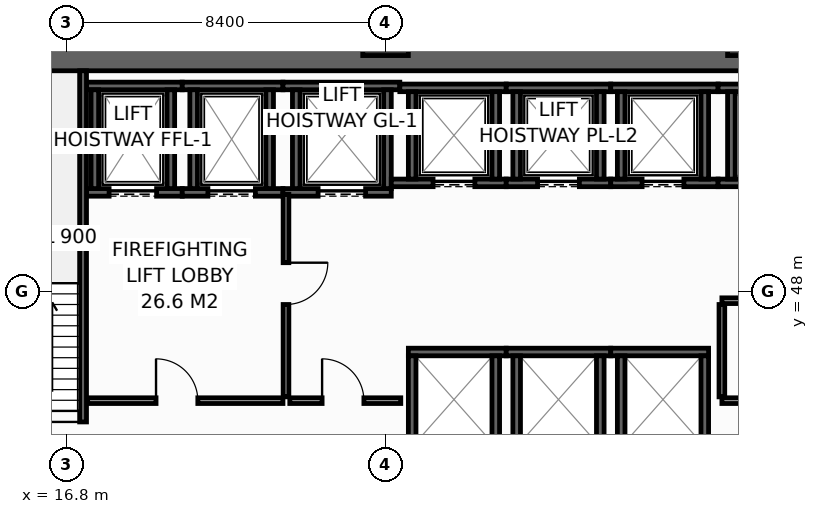
"""IFC4 building model, lengths in metres.
Left out: names, types, materials, properties, quantities, classifications, styles, units other than length and angle.
Written with IfcOpenShell. Run it as: python <this file> out.ifc"""

import sys

from ifc_helpers import new_model, si_unit, direction, frame, frame_2d, origin, origin_2d, place, context, subcontext, project, spatial, rectangle, hollow_rectangle, extrude, element, fill, save


model = new_model("IFC4")
c1 = context("Model", 3, precision=1e-05, world=origin(), true_north=direction((0.0, 1.0)))
c2 = subcontext(c1, "Body", "Model", "MODEL_VIEW")
j1 = project(units=[si_unit("LENGTHUNIT", "METRE"), si_unit("PLANEANGLEUNIT", "RADIAN")], contexts=[c1])
p1 = place(None, origin())
s1 = spatial("IfcSite", under=j1, at=p1, CompositionType="ELEMENT")
p2 = place(p1, origin())
s2 = spatial("IfcBuilding", under=s1, at=p2, CompositionType="ELEMENT")
p3 = place(p2, frame((0.0, 0.0, 78.0)))
s3 = spatial("IfcBuildingStorey", under=s2, at=p3, CompositionType="ELEMENT", Elevation=78.0)
p4 = place(p3, frame((13.5, 54.1, 0.0), z_axis=(0.0, 0.0, 1.0), x_axis=(1.0, 0.0, 0.0)))
e1 = element("IfcWall", 1, at=p4, inside=s3, PredefinedType="SHEAR", context=c2, shape_type="SweptSolid", body=[
    extrude(rectangle(XDim=32.9, YDim=0.6, at=frame_2d((16.45, 0.0))), origin(), (0.0, 0.0, 1.0), 4.15),
])
for number, where, z_axis, x_axis in (
    (2, (25.2, 54.8, 0.0), (0.0, 0.0, 1.0), (1.0, 0.0, 0.0)),
    (3, (34.8, 54.8, 0.0), (0.0, 0.0, 1.0), (1.0, 0.0, 0.0)),
):
    element("IfcColumn", number, at=place(p3, frame(where, z_axis=z_axis, x_axis=x_axis)), inside=s3, PredefinedType="COLUMN", context=c2, shape_type="SweptSolid", body=[
        extrude(hollow_rectangle(XDim=1.2, YDim=1.2, WallThickness=0.055, at=origin_2d()), origin(), (0.0, 0.0, 1.0), 4.4),
    ])
p5 = place(p3, frame((17.33, 50.6, 0.0), z_axis=(0.0, 0.0, 1.0), x_axis=(1.0, 0.0, 0.0)))
e4 = element("IfcWall", 4, at=p5, inside=s3, PredefinedType="SHEAR", context=c2, shape_type="SweptSolid", body=[
    extrude(rectangle(XDim=2.52, YDim=0.2, at=frame_2d((1.26, 0.0))), origin(), (0.0, 0.0, 1.0), 4.15),
])
p6 = place(p5, frame((0.595, 0.0, 0.0)))
e5 = element("IfcOpeningElement", 5, at=p6, cuts=e4, PredefinedType="OPENING", context=c2, shape_type="SweptSolid", body=[
    extrude(rectangle(XDim=1.25, YDim=2.3, at=frame_2d((0.625, 1.15))), frame((0.0, 0.11, 0.0), z_axis=(0.0, -1.0, 0.0), x_axis=(1.0, 0.0, 0.0)), (0.0, 0.0, 1.0), 0.22),
])
p7 = place(p3, frame((17.33, 53.4, 0.0), z_axis=(0.0, 0.0, 1.0), x_axis=(1.0, 0.0, 0.0)))
e6 = element("IfcWall", 6, at=p7, inside=s3, PredefinedType="SHEAR", context=c2, shape_type="SweptSolid", body=[
    extrude(rectangle(XDim=2.52, YDim=0.2, at=frame_2d((1.26, 0.0))), origin(), (0.0, 0.0, 1.0), 4.15),
])
for number, where, z_axis, x_axis in (
    (7, (17.55, 50.7, 0.0), (0.0, 0.0, 1.0), (0.0, 1.0, 0.0)),
    (8, (19.55, 50.7, 0.0), (0.0, 0.0, 1.0), (0.0, 1.0, 0.0)),
):
    element("IfcWall", number, at=place(p3, frame(where, z_axis=z_axis, x_axis=x_axis)), inside=s3, PredefinedType="SHEAR", context=c2, shape_type="SweptSolid", body=[
        extrude(rectangle(XDim=2.6, YDim=0.2, at=frame_2d((1.3, 0.0))), origin(), (0.0, 0.0, 1.0), 4.15),
    ])
p8 = place(p3, frame((19.85, 50.6, 0.0), z_axis=(0.0, 0.0, 1.0), x_axis=(1.0, 0.0, 0.0)))
e9 = element("IfcWall", 9, at=p8, inside=s3, PredefinedType="SHEAR", context=c2, shape_type="SweptSolid", body=[
    extrude(rectangle(XDim=2.65, YDim=0.2, at=frame_2d((1.325, 0.0))), origin(), (0.0, 0.0, 1.0), 4.15),
])
p9 = place(p8, frame((0.675, 0.0, 0.0)))
e10 = element("IfcOpeningElement", 10, at=p9, cuts=e9, PredefinedType="OPENING", context=c2, shape_type="SweptSolid", body=[
    extrude(rectangle(XDim=1.25, YDim=2.3, at=frame_2d((0.625, 1.15))), frame((0.0, 0.11, 0.0), z_axis=(0.0, -1.0, 0.0), x_axis=(1.0, 0.0, 0.0)), (0.0, 0.0, 1.0), 0.22),
])
p10 = place(p3, frame((19.85, 53.4, 0.0), z_axis=(0.0, 0.0, 1.0), x_axis=(1.0, 0.0, 0.0)))
e11 = element("IfcWall", 11, at=p10, inside=s3, PredefinedType="SHEAR", context=c2, shape_type="SweptSolid", body=[
    extrude(rectangle(XDim=2.65, YDim=0.2, at=frame_2d((1.325, 0.0))), origin(), (0.0, 0.0, 1.0), 4.15),
])
for number, where, z_axis, x_axis in (
    (12, (20.15, 50.7, 0.0), (0.0, 0.0, 1.0), (0.0, 1.0, 0.0)),
    (13, (22.15, 50.7, 0.0), (0.0, 0.0, 1.0), (0.0, 1.0, 0.0)),
):
    element("IfcWall", number, at=place(p3, frame(where, z_axis=z_axis, x_axis=x_axis)), inside=s3, PredefinedType="SHEAR", context=c2, shape_type="SweptSolid", body=[
        extrude(rectangle(XDim=2.6, YDim=0.2, at=frame_2d((1.3, 0.0))), origin(), (0.0, 0.0, 1.0), 4.15),
    ])
p11 = place(p3, frame((22.5, 50.6, 0.0), z_axis=(0.0, 0.0, 1.0), x_axis=(1.0, 0.0, 0.0)))
e14 = element("IfcWall", 14, at=p11, inside=s3, PredefinedType="SHEAR", context=c2, shape_type="SweptSolid", body=[
    extrude(rectangle(XDim=2.85, YDim=0.2, at=frame_2d((1.425, 0.0))), origin(), (0.0, 0.0, 1.0), 4.15),
])
p12 = place(p11, frame((0.925, 0.0, 0.0)))
e15 = element("IfcOpeningElement", 15, at=p12, cuts=e14, PredefinedType="OPENING", context=c2, shape_type="SweptSolid", body=[
    extrude(rectangle(XDim=1.25, YDim=2.3, at=frame_2d((0.625, 1.15))), frame((0.0, 0.11, 0.0), z_axis=(0.0, -1.0, 0.0), x_axis=(1.0, 0.0, 0.0)), (0.0, 0.0, 1.0), 0.22),
])
p13 = place(p3, frame((22.5, 53.4, 0.0), z_axis=(0.0, 0.0, 1.0), x_axis=(1.0, 0.0, 0.0)))
e16 = element("IfcWall", 16, at=p13, inside=s3, PredefinedType="SHEAR", context=c2, shape_type="SweptSolid", body=[
    extrude(rectangle(XDim=3.075, YDim=0.2, at=frame_2d((1.538, 0.0))), origin(), (0.0, 0.0, 1.0), 4.15),
])
for number, where, z_axis, x_axis in (
    (17, (22.85, 50.7, 0.0), (0.0, 0.0, 1.0), (0.0, 1.0, 0.0)),
    (18, (25.25, 50.7, 0.0), (0.0, 0.0, 1.0), (0.0, 1.0, 0.0)),
):
    element("IfcWall", number, at=place(p3, frame(where, z_axis=z_axis, x_axis=x_axis)), inside=s3, PredefinedType="SHEAR", context=c2, shape_type="SweptSolid", body=[
        extrude(rectangle(XDim=2.6, YDim=0.2, at=frame_2d((1.3, 0.0))), origin(), (0.0, 0.0, 1.0), 4.15),
    ])
p14 = place(p3, frame((25.35, 50.85, 0.0), z_axis=(0.0, 0.0, 1.0), x_axis=(1.0, 0.0, 0.0)))
e19 = element("IfcWall", 19, at=p14, inside=s3, PredefinedType="SHEAR", context=c2, shape_type="SweptSolid", body=[
    extrude(rectangle(XDim=3.025, YDim=0.2, at=frame_2d((1.512, 0.0))), origin(), (0.0, 0.0, 1.0), 4.15),
])
p15 = place(p14, frame((1.1, 0.0, 0.0)))
e20 = element("IfcOpeningElement", 20, at=p15, cuts=e19, PredefinedType="OPENING", context=c2, shape_type="SweptSolid", body=[
    extrude(rectangle(XDim=1.1, YDim=2.2, at=frame_2d((0.55, 1.1))), frame((0.0, 0.11, 0.0), z_axis=(0.0, -1.0, 0.0), x_axis=(1.0, 0.0, 0.0)), (0.0, 0.0, 1.0), 0.22),
])
p16 = place(p3, frame((25.575, 53.35, 0.0), z_axis=(0.0, 0.0, 1.0), x_axis=(1.0, 0.0, 0.0)))
e21 = element("IfcWall", 21, at=p16, inside=s3, PredefinedType="SHEAR", context=c2, shape_type="SweptSolid", body=[
    extrude(rectangle(XDim=2.8, YDim=0.2, at=frame_2d((1.4, 0.0))), origin(), (0.0, 0.0, 1.0), 4.15),
])
for number, where, z_axis, x_axis in (
    (22, (25.9, 50.95, 0.0), (0.0, 0.0, 1.0), (0.0, 1.0, 0.0)),
    (23, (28.1, 50.95, 0.0), (0.0, 0.0, 1.0), (0.0, 1.0, 0.0)),
):
    element("IfcWall", number, at=place(p3, frame(where, z_axis=z_axis, x_axis=x_axis)), inside=s3, PredefinedType="SHEAR", context=c2, shape_type="SweptSolid", body=[
        extrude(rectangle(XDim=2.3, YDim=0.2, at=frame_2d((1.15, 0.0))), origin(), (0.0, 0.0, 1.0), 4.15),
    ])
p17 = place(p3, frame((28.375, 50.85, 0.0), z_axis=(0.0, 0.0, 1.0), x_axis=(1.0, 0.0, 0.0)))
e24 = element("IfcWall", 24, at=p17, inside=s3, PredefinedType="SHEAR", context=c2, shape_type="SweptSolid", body=[
    extrude(rectangle(XDim=2.75, YDim=0.2, at=frame_2d((1.375, 0.0))), origin(), (0.0, 0.0, 1.0), 4.15),
])
p18 = place(p17, frame((0.825, 0.0, 0.0)))
e25 = element("IfcOpeningElement", 25, at=p18, cuts=e24, PredefinedType="OPENING", context=c2, shape_type="SweptSolid", body=[
    extrude(rectangle(XDim=1.1, YDim=2.2, at=frame_2d((0.55, 1.1))), frame((0.0, 0.11, 0.0), z_axis=(0.0, -1.0, 0.0), x_axis=(1.0, 0.0, 0.0)), (0.0, 0.0, 1.0), 0.22),
])
p19 = place(p3, frame((28.375, 53.35, 0.0), z_axis=(0.0, 0.0, 1.0), x_axis=(1.0, 0.0, 0.0)))
e26 = element("IfcWall", 26, at=p19, inside=s3, PredefinedType="SHEAR", context=c2, shape_type="SweptSolid", body=[
    extrude(rectangle(XDim=2.75, YDim=0.2, at=frame_2d((1.375, 0.0))), origin(), (0.0, 0.0, 1.0), 4.15),
])
for number, where, z_axis, x_axis in (
    (27, (28.65, 50.95, 0.0), (0.0, 0.0, 1.0), (0.0, 1.0, 0.0)),
    (28, (30.85, 50.95, 0.0), (0.0, 0.0, 1.0), (0.0, 1.0, 0.0)),
):
    element("IfcWall", number, at=place(p3, frame(where, z_axis=z_axis, x_axis=x_axis)), inside=s3, PredefinedType="SHEAR", context=c2, shape_type="SweptSolid", body=[
        extrude(rectangle(XDim=2.3, YDim=0.2, at=frame_2d((1.15, 0.0))), origin(), (0.0, 0.0, 1.0), 4.15),
    ])
p20 = place(p3, frame((31.125, 50.85, 0.0), z_axis=(0.0, 0.0, 1.0), x_axis=(1.0, 0.0, 0.0)))
e29 = element("IfcWall", 29, at=p20, inside=s3, PredefinedType="SHEAR", context=c2, shape_type="SweptSolid", body=[
    extrude(rectangle(XDim=2.825, YDim=0.2, at=frame_2d((1.413, 0.0))), origin(), (0.0, 0.0, 1.0), 4.15),
])
p21 = place(p20, frame((0.825, 0.0, 0.0)))
e30 = element("IfcOpeningElement", 30, at=p21, cuts=e29, PredefinedType="OPENING", context=c2, shape_type="SweptSolid", body=[
    extrude(rectangle(XDim=1.1, YDim=2.2, at=frame_2d((0.55, 1.1))), frame((0.0, 0.11, 0.0), z_axis=(0.0, -1.0, 0.0), x_axis=(1.0, 0.0, 0.0)), (0.0, 0.0, 1.0), 0.22),
])
p22 = place(p3, frame((31.125, 53.35, 0.0), z_axis=(0.0, 0.0, 1.0), x_axis=(1.0, 0.0, 0.0)))
e31 = element("IfcWall", 31, at=p22, inside=s3, PredefinedType="SHEAR", context=c2, shape_type="SweptSolid", body=[
    extrude(rectangle(XDim=2.825, YDim=0.2, at=frame_2d((1.413, 0.0))), origin(), (0.0, 0.0, 1.0), 4.15),
])
for number, where, z_axis, x_axis in (
    (32, (31.4, 50.95, 0.0), (0.0, 0.0, 1.0), (0.0, 1.0, 0.0)),
    (33, (33.6, 50.95, 0.0), (0.0, 0.0, 1.0), (0.0, 1.0, 0.0)),
):
    element("IfcWall", number, at=place(p3, frame(where, z_axis=z_axis, x_axis=x_axis)), inside=s3, PredefinedType="SHEAR", context=c2, shape_type="SweptSolid", body=[
        extrude(rectangle(XDim=2.3, YDim=0.2, at=frame_2d((1.15, 0.0))), origin(), (0.0, 0.0, 1.0), 4.15),
    ])
p23 = place(p3, frame((25.8, 46.4, 0.0), z_axis=(0.0, 0.0, 1.0), x_axis=(1.0, 0.0, 0.0)))
e34 = element("IfcWall", 34, at=p23, inside=s3, PredefinedType="SHEAR", context=c2, shape_type="SweptSolid", body=[
    extrude(rectangle(XDim=2.575, YDim=0.2, at=frame_2d((1.288, 0.0))), origin(), (0.0, 0.0, 1.0), 4.15),
])
for number, where, z_axis, x_axis in (
    (35, (25.9, 44.0, 0.0), (0.0, 0.0, 1.0), (0.0, 1.0, 0.0)),
    (36, (28.1, 44.0, 0.0), (0.0, 0.0, 1.0), (0.0, 1.0, 0.0)),
):
    element("IfcWall", number, at=place(p3, frame(where, z_axis=z_axis, x_axis=x_axis)), inside=s3, PredefinedType="SHEAR", context=c2, shape_type="SweptSolid", body=[
        extrude(rectangle(XDim=2.3, YDim=0.2, at=frame_2d((1.15, 0.0))), origin(), (0.0, 0.0, 1.0), 4.15),
    ])
p24 = place(p3, frame((28.375, 46.4, 0.0), z_axis=(0.0, 0.0, 1.0), x_axis=(1.0, 0.0, 0.0)))
e37 = element("IfcWall", 37, at=p24, inside=s3, PredefinedType="SHEAR", context=c2, shape_type="SweptSolid", body=[
    extrude(rectangle(XDim=2.75, YDim=0.2, at=frame_2d((1.375, 0.0))), origin(), (0.0, 0.0, 1.0), 4.15),
])
for number, where, z_axis, x_axis in (
    (38, (28.65, 44.0, 0.0), (0.0, 0.0, 1.0), (0.0, 1.0, 0.0)),
    (39, (30.85, 44.0, 0.0), (0.0, 0.0, 1.0), (0.0, 1.0, 0.0)),
):
    element("IfcWall", number, at=place(p3, frame(where, z_axis=z_axis, x_axis=x_axis)), inside=s3, PredefinedType="SHEAR", context=c2, shape_type="SweptSolid", body=[
        extrude(rectangle(XDim=2.3, YDim=0.2, at=frame_2d((1.15, 0.0))), origin(), (0.0, 0.0, 1.0), 4.15),
    ])
p25 = place(p3, frame((31.125, 46.4, 0.0), z_axis=(0.0, 0.0, 1.0), x_axis=(1.0, 0.0, 0.0)))
e40 = element("IfcWall", 40, at=p25, inside=s3, PredefinedType="SHEAR", context=c2, shape_type="SweptSolid", body=[
    extrude(rectangle(XDim=2.575, YDim=0.2, at=frame_2d((1.288, 0.0))), origin(), (0.0, 0.0, 1.0), 4.15),
])
for number, where, z_axis, x_axis in (
    (41, (31.4, 44.0, 0.0), (0.0, 0.0, 1.0), (0.0, 1.0, 0.0)),
    (42, (33.6, 44.0, 0.0), (0.0, 0.0, 1.0), (0.0, 1.0, 0.0)),
):
    element("IfcWall", number, at=place(p3, frame(where, z_axis=z_axis, x_axis=x_axis)), inside=s3, PredefinedType="SHEAR", context=c2, shape_type="SweptSolid", body=[
        extrude(rectangle(XDim=2.3, YDim=0.2, at=frame_2d((1.15, 0.0))), origin(), (0.0, 0.0, 1.0), 4.15),
    ])
for number, where, z_axis, x_axis in (
    (43, (33.95, 50.85, 0.0), (0.0, 0.0, 1.0), (1.0, 0.0, 0.0)),
    (44, (33.95, 53.35, 0.0), (0.0, 0.0, 1.0), (1.0, 0.0, 0.0)),
):
    element("IfcWall", number, at=place(p3, frame(where, z_axis=z_axis, x_axis=x_axis)), inside=s3, PredefinedType="SHEAR", context=c2, shape_type="SweptSolid", body=[
        extrude(rectangle(XDim=2.825, YDim=0.2, at=frame_2d((1.413, 0.0))), origin(), (0.0, 0.0, 1.0), 4.15),
    ])
p26 = place(p3, frame((34.3, 50.95, 0.0), z_axis=(0.0, 0.0, 1.0), x_axis=(0.0, 1.0, 0.0)))
e45 = element("IfcWall", 45, at=p26, inside=s3, PredefinedType="SHEAR", context=c2, shape_type="SweptSolid", body=[
    extrude(rectangle(XDim=2.3, YDim=0.2, at=frame_2d((1.15, 0.0))), origin(), (0.0, 0.0, 1.0), 4.15),
])
p27 = place(p3, frame((17.24, 43.4, 0.0), z_axis=(0.0, 0.0, 1.0), x_axis=(0.0, 1.0, 0.0)))
e46 = element("IfcWall", 46, at=p27, inside=s3, PredefinedType="SHEAR", context=c2, shape_type="SweptSolid", body=[
    extrude(rectangle(XDim=10.4, YDim=0.18, at=frame_2d((5.2, 0.0))), origin(), (0.0, 0.0, 1.0), 4.15),
])
p28 = place(p27, frame((0.16, 0.0, 0.0)))
e47 = element("IfcOpeningElement", 47, at=p28, cuts=e46, PredefinedType="OPENING", context=c2, shape_type="SweptSolid", body=[
    extrude(rectangle(XDim=1.0, YDim=2.15, at=frame_2d((0.5, 1.075))), frame((0.0, 0.1, 0.0), z_axis=(0.0, -1.0, 0.0), x_axis=(1.0, 0.0, 0.0)), (0.0, 0.0, 1.0), 0.2),
])
p29 = place(p3, frame((17.36, 45.12, 0.0), z_axis=(0.0, 0.0, 1.0), x_axis=(1.0, 0.0, 0.0)))
e48 = element("IfcWall", 48, at=p29, inside=s3, PredefinedType="PARTITIONING", context=c2, shape_type="SweptSolid", body=[
    extrude(rectangle(XDim=5.14, YDim=0.15, at=frame_2d((2.57, 0.0))), origin(), (0.0, 0.0, 1.0), 4.15),
])
p30 = place(p29, frame((1.8, 0.0, 0.0)))
e49 = element("IfcOpeningElement", 49, at=p30, cuts=e48, PredefinedType="OPENING", context=c2, shape_type="SweptSolid", body=[
    extrude(rectangle(XDim=1.1, YDim=2.15, at=frame_2d((0.55, 1.075))), frame((0.0, 0.085, 0.0), z_axis=(0.0, -1.0, 0.0), x_axis=(1.0, 0.0, 0.0)), (0.0, 0.0, 1.0), 0.17),
])
p31 = place(p3, frame((22.58, 50.55, 0.0), z_axis=(0.0, 0.0, 1.0), x_axis=(0.0, -1.0, 0.0)))
e50 = element("IfcWall", 50, at=p31, inside=s3, PredefinedType="PARTITIONING", context=c2, shape_type="SweptSolid", body=[
    extrude(rectangle(XDim=5.33, YDim=0.15, at=frame_2d((2.665, 0.0))), origin(), (0.0, 0.0, 1.0), 4.15),
])
p32 = place(p31, frame((1.8, 0.0, 0.0)))
e51 = element("IfcOpeningElement", 51, at=p32, cuts=e50, PredefinedType="OPENING", context=c2, shape_type="SweptSolid", body=[
    extrude(rectangle(XDim=1.1, YDim=2.15, at=frame_2d((0.55, 1.075))), frame((0.0, 0.085, 0.0), z_axis=(0.0, -1.0, 0.0), x_axis=(1.0, 0.0, 0.0)), (0.0, 0.0, 1.0), 0.17),
])
p33 = place(p3, frame((22.68, 45.12, 0.0), z_axis=(0.0, 0.0, 1.0), x_axis=(1.0, 0.0, 0.0)))
e52 = element("IfcWall", 52, at=p33, inside=s3, PredefinedType="PARTITIONING", context=c2, shape_type="SweptSolid", body=[
    extrude(rectangle(XDim=2.92, YDim=0.15, at=frame_2d((1.46, 0.0))), origin(), (0.0, 0.0, 1.0), 4.15),
])
p34 = place(p33, frame((0.85, 0.0, 0.0)))
e53 = element("IfcOpeningElement", 53, at=p34, cuts=e52, PredefinedType="OPENING", context=c2, shape_type="SweptSolid", body=[
    extrude(rectangle(XDim=1.1, YDim=2.15, at=frame_2d((0.55, 1.075))), frame((0.0, 0.085, 0.0), z_axis=(0.0, -1.0, 0.0), x_axis=(1.0, 0.0, 0.0)), (0.0, 0.0, 1.0), 0.17),
])
p35 = place(p3, frame((34.05, 45.12, 0.0), z_axis=(0.0, 0.0, 1.0), x_axis=(1.0, 0.0, 0.0)))
e54 = element("IfcWall", 54, at=p35, inside=s3, PredefinedType="PARTITIONING", context=c2, shape_type="SweptSolid", body=[
    extrude(rectangle(XDim=8.45, YDim=0.15, at=frame_2d((4.225, 0.0))), origin(), (0.0, 0.0, 1.0), 4.15),
])
p36 = place(p35, frame((3.6, 0.0, 0.0)))
e55 = element("IfcOpeningElement", 55, at=p36, cuts=e54, PredefinedType="OPENING", context=c2, shape_type="SweptSolid", body=[
    extrude(rectangle(XDim=0.95, YDim=2.15, at=frame_2d((0.475, 1.075))), frame((0.0, 0.085, 0.0), z_axis=(0.0, -1.0, 0.0), x_axis=(1.0, 0.0, 0.0)), (0.0, 0.0, 1.0), 0.17),
])
p37 = place(p3, frame((34.05, 47.75, 0.0), z_axis=(0.0, 0.0, 1.0), x_axis=(1.0, 0.0, 0.0)))
e56 = element("IfcWall", 56, at=p37, inside=s3, PredefinedType="PARTITIONING", context=c2, shape_type="SweptSolid", body=[
    extrude(rectangle(XDim=8.45, YDim=0.15, at=frame_2d((4.225, 0.0))), origin(), (0.0, 0.0, 1.0), 4.15),
])
p38 = place(p3, frame((34.05, 45.22, 0.0), z_axis=(0.0, 0.0, 1.0), x_axis=(0.0, 1.0, 0.0)))
e57 = element("IfcWall", 57, at=p38, inside=s3, PredefinedType="PARTITIONING", context=c2, shape_type="SweptSolid", body=[
    extrude(rectangle(XDim=2.43, YDim=0.15, at=frame_2d((1.215, 0.0))), origin(), (0.0, 0.0, 1.0), 4.15),
])
p39 = place(p6, origin())
e58 = element("IfcDoor", 58, at=p39, inside=s3, OperationType="SLIDING_TO_LEFT", PredefinedType="DOOR", context=c2, shape_type="SweptSolid", body=[
    extrude(rectangle(XDim=1.25, YDim=2.3, at=frame_2d((0.625, 1.15))), frame((0.0, 0.025, 0.0), z_axis=(0.0, -1.0, 0.0), x_axis=(1.0, 0.0, 0.0)), (0.0, 0.0, 1.0), 0.05),
])
fill(e5, e58)
p40 = place(p9, origin())
e59 = element("IfcDoor", 59, at=p40, inside=s3, OperationType="SLIDING_TO_LEFT", PredefinedType="DOOR", context=c2, shape_type="SweptSolid", body=[
    extrude(rectangle(XDim=1.25, YDim=2.3, at=frame_2d((0.625, 1.15))), frame((0.0, 0.025, 0.0), z_axis=(0.0, -1.0, 0.0), x_axis=(1.0, 0.0, 0.0)), (0.0, 0.0, 1.0), 0.05),
])
fill(e10, e59)
p41 = place(p12, origin())
e60 = element("IfcDoor", 60, at=p41, inside=s3, OperationType="SLIDING_TO_LEFT", PredefinedType="DOOR", context=c2, shape_type="SweptSolid", body=[
    extrude(rectangle(XDim=1.25, YDim=2.3, at=frame_2d((0.625, 1.15))), frame((0.0, 0.025, 0.0), z_axis=(0.0, -1.0, 0.0), x_axis=(1.0, 0.0, 0.0)), (0.0, 0.0, 1.0), 0.05),
])
fill(e15, e60)
p42 = place(p15, origin())
e61 = element("IfcDoor", 61, at=p42, inside=s3, OperationType="SLIDING_TO_LEFT", PredefinedType="DOOR", context=c2, shape_type="SweptSolid", body=[
    extrude(rectangle(XDim=1.1, YDim=2.2, at=frame_2d((0.55, 1.1))), frame((0.0, 0.025, 0.0), z_axis=(0.0, -1.0, 0.0), x_axis=(1.0, 0.0, 0.0)), (0.0, 0.0, 1.0), 0.05),
])
fill(e20, e61)
p43 = place(p18, origin())
e62 = element("IfcDoor", 62, at=p43, inside=s3, OperationType="SLIDING_TO_LEFT", PredefinedType="DOOR", context=c2, shape_type="SweptSolid", body=[
    extrude(rectangle(XDim=1.1, YDim=2.2, at=frame_2d((0.55, 1.1))), frame((0.0, 0.025, 0.0), z_axis=(0.0, -1.0, 0.0), x_axis=(1.0, 0.0, 0.0)), (0.0, 0.0, 1.0), 0.05),
])
fill(e25, e62)
p44 = place(p21, origin())
e63 = element("IfcDoor", 63, at=p44, inside=s3, OperationType="SLIDING_TO_LEFT", PredefinedType="DOOR", context=c2, shape_type="SweptSolid", body=[
    extrude(rectangle(XDim=1.1, YDim=2.2, at=frame_2d((0.55, 1.1))), frame((0.0, 0.025, 0.0), z_axis=(0.0, -1.0, 0.0), x_axis=(1.0, 0.0, 0.0)), (0.0, 0.0, 1.0), 0.05),
])
fill(e30, e63)
p45 = place(p28, origin())
e64 = element("IfcDoor", 64, at=p45, inside=s3, OperationType="SINGLE_SWING_RIGHT", PredefinedType="DOOR", context=c2, shape_type="SweptSolid", body=[
    extrude(rectangle(XDim=1.0, YDim=2.15, at=frame_2d((0.5, 1.075))), frame((0.0, 0.025, 0.0), z_axis=(0.0, -1.0, 0.0), x_axis=(1.0, 0.0, 0.0)), (0.0, 0.0, 1.0), 0.05),
])
fill(e47, e64)
p46 = place(p30, origin())
e65 = element("IfcDoor", 65, at=p46, inside=s3, OperationType="SINGLE_SWING_LEFT", PredefinedType="DOOR", context=c2, shape_type="SweptSolid", body=[
    extrude(rectangle(XDim=1.1, YDim=2.15, at=frame_2d((0.55, 1.075))), frame((0.0, 0.025, 0.0), z_axis=(0.0, -1.0, 0.0), x_axis=(1.0, 0.0, 0.0)), (0.0, 0.0, 1.0), 0.05),
])
fill(e49, e65)
p47 = place(p32, origin())
e66 = element("IfcDoor", 66, at=p47, inside=s3, OperationType="SINGLE_SWING_LEFT", PredefinedType="DOOR", context=c2, shape_type="SweptSolid", body=[
    extrude(rectangle(XDim=1.1, YDim=2.15, at=frame_2d((0.55, 1.075))), frame((0.0, 0.025, 0.0), z_axis=(0.0, -1.0, 0.0), x_axis=(1.0, 0.0, 0.0)), (0.0, 0.0, 1.0), 0.05),
])
fill(e51, e66)
p48 = place(p34, origin())
e67 = element("IfcDoor", 67, at=p48, inside=s3, OperationType="SINGLE_SWING_LEFT", PredefinedType="DOOR", context=c2, shape_type="SweptSolid", body=[
    extrude(rectangle(XDim=1.1, YDim=2.15, at=frame_2d((0.55, 1.075))), frame((0.0, 0.025, 0.0), z_axis=(0.0, -1.0, 0.0), x_axis=(1.0, 0.0, 0.0)), (0.0, 0.0, 1.0), 0.05),
])
fill(e53, e67)
save(model, sys.argv[1])
